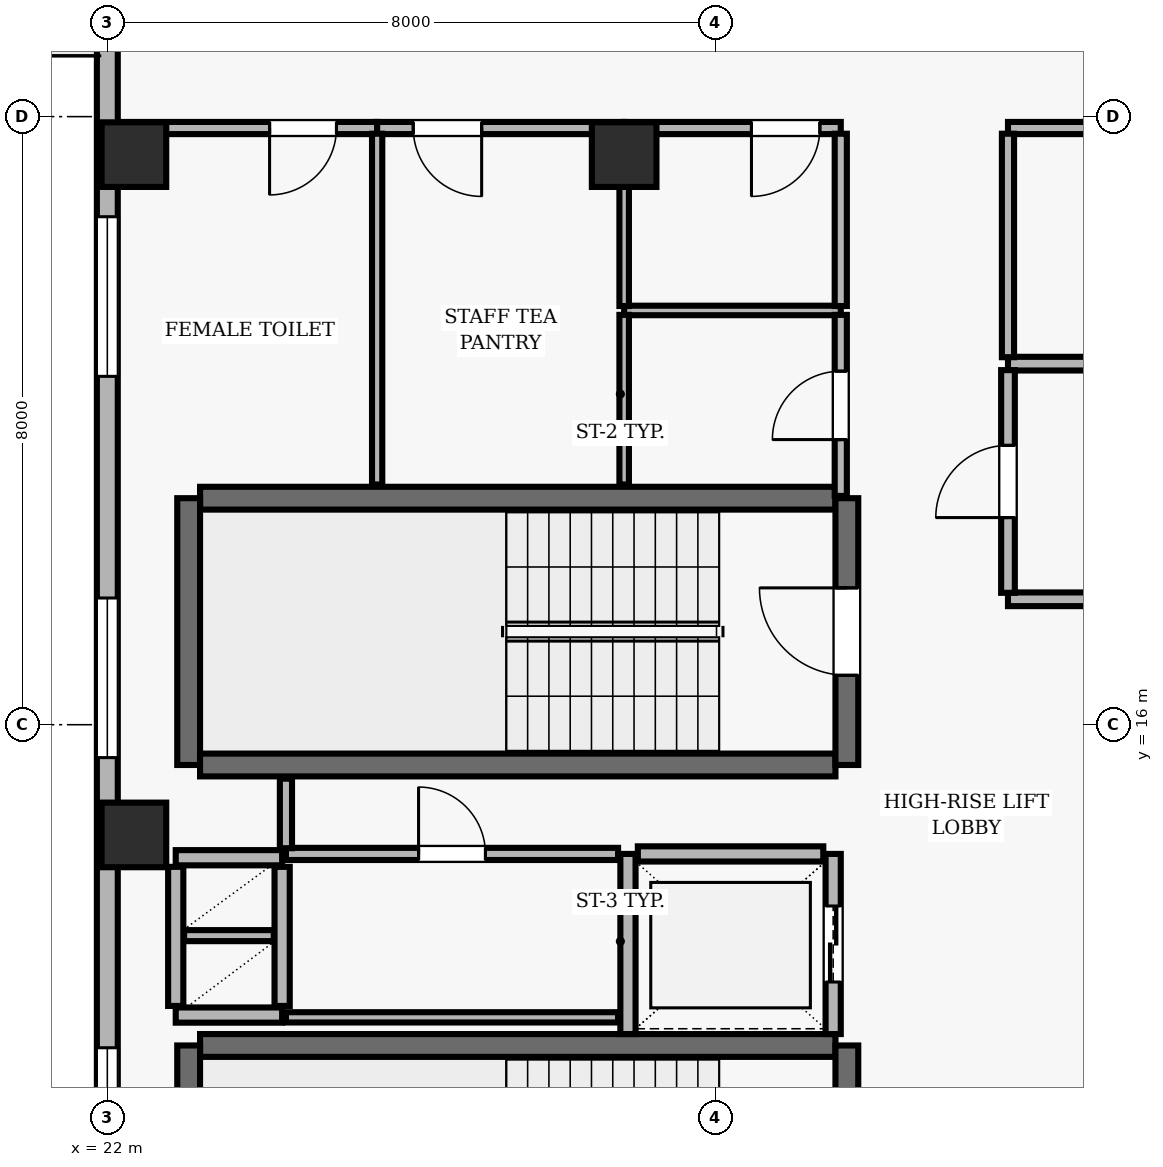
"""IFC4 building model, lengths in metres.
Left out: names, types, materials, properties, quantities, classifications, styles, units other than length and angle.
Written with IfcOpenShell. Run it as: python <this file> out.ifc"""

import sys

from ifc_helpers import new_model, si_unit, direction, frame, frame_2d, origin, origin_2d, place, context, subcontext, project, spatial, rectangle, extrude, element, fill, save


model = new_model("IFC4")
c1 = context("Model", 3, precision=1e-05, world=origin(), true_north=direction((0.0, 1.0)))
c2 = subcontext(c1, "Body", "Model", "MODEL_VIEW")
j1 = project(units=[si_unit("LENGTHUNIT", "METRE"), si_unit("PLANEANGLEUNIT", "RADIAN")], contexts=[c1])
p1 = place(None, origin())
s1 = spatial("IfcSite", under=j1, at=p1, CompositionType="ELEMENT")
p2 = place(p1, origin())
s2 = spatial("IfcBuilding", under=s1, at=p2, CompositionType="ELEMENT")
p3 = place(p2, frame((0.0, 0.0, 259.9)))
s3 = spatial("IfcBuildingStorey", under=s2, at=p3, CompositionType="ELEMENT", Elevation=259.9)
for number, where, z_axis, x_axis in (
    (1, (22.35, 14.55, 0.0), (0.0, 0.0, 1.0), (1.0, 0.0, 0.0)),
    (2, (22.35, 23.5, 0.0), (0.0, 0.0, 1.0), (1.0, 0.0, 0.0)),
    (3, (28.8, 23.5, 0.0), (0.0, 0.0, 1.0), (1.0, 0.0, 0.0)),
):
    element("IfcColumn", number, at=place(p3, frame(where, z_axis=z_axis, x_axis=x_axis)), inside=s3, PredefinedType="COLUMN", context=c2, shape_type="SweptSolid", body=[
        extrude(rectangle(XDim=0.85, YDim=0.85, at=origin_2d()), origin(), (0.0, 0.0, 1.0), 3.9),
    ])
p4 = place(p3, frame((22.0, 35.3, 0.0), z_axis=(0.0, 0.0, 1.0), x_axis=(0.0, -1.0, 0.0)))
e4 = element("IfcWall", 4, at=p4, inside=s3, PredefinedType="SOLIDWALL", context=c2, shape_type="SweptSolid", body=[
    extrude(rectangle(XDim=32.8, YDim=0.275, at=frame_2d((16.4, 0.0))), origin(), (0.0, 0.0, 1.0), 3.69),
])
p5 = place(p4, frame((7.3, 0.0, 0.0)))
e5 = element("IfcOpeningElement", 5, at=p5, cuts=e4, PredefinedType="OPENING", context=c2, shape_type="SweptSolid", body=[
    extrude(rectangle(XDim=1.0, YDim=2.2, at=frame_2d((0.5, 1.1))), frame((0.0, 0.147, 0.0), z_axis=(0.0, -1.0, 0.0), x_axis=(1.0, 0.0, 0.0)), (0.0, 0.0, 1.0), 0.295),
])
p6 = place(p4, frame((12.617, 0.0, 0.9)))
e6 = element("IfcOpeningElement", 6, at=p6, cuts=e4, PredefinedType="OPENING", context=c2, shape_type="SweptSolid", body=[
    extrude(rectangle(XDim=2.1, YDim=1.6, at=frame_2d((1.05, 0.8))), frame((0.0, 0.147, 0.0), z_axis=(0.0, -1.0, 0.0), x_axis=(1.0, 0.0, 0.0)), (0.0, 0.0, 1.0), 0.295),
])
p7 = place(p4, frame((17.633, 0.0, 0.9)))
e7 = element("IfcOpeningElement", 7, at=p7, cuts=e4, PredefinedType="OPENING", context=c2, shape_type="SweptSolid", body=[
    extrude(rectangle(XDim=2.1, YDim=1.6, at=frame_2d((1.05, 0.8))), frame((0.0, 0.147, 0.0), z_axis=(0.0, -1.0, 0.0), x_axis=(1.0, 0.0, 0.0)), (0.0, 0.0, 1.0), 0.295),
])
p8 = place(p4, frame((23.55, 0.0, 0.9)))
e8 = element("IfcOpeningElement", 8, at=p8, cuts=e4, PredefinedType="OPENING", context=c2, shape_type="SweptSolid", body=[
    extrude(rectangle(XDim=2.1, YDim=1.6, at=frame_2d((1.05, 0.8))), frame((0.0, 0.147, 0.0), z_axis=(0.0, -1.0, 0.0), x_axis=(1.0, 0.0, 0.0)), (0.0, 0.0, 1.0), 0.295),
])
p9 = place(p3, frame((31.58, 18.98, 0.0), z_axis=(0.0, 0.0, 1.0), x_axis=(-1.0, 0.0, 0.0)))
e9 = element("IfcWall", 9, at=p9, inside=s3, PredefinedType="SHEAR", context=c2, shape_type="SweptSolid", body=[
    extrude(rectangle(XDim=8.36, YDim=0.3, at=frame_2d((4.18, 0.0))), origin(), (0.0, 0.0, 1.0), 3.69),
])
p10 = place(p3, frame((23.07, 18.98, 0.0), z_axis=(0.0, 0.0, 1.0), x_axis=(0.0, -1.0, 0.0)))
e10 = element("IfcWall", 10, at=p10, inside=s3, PredefinedType="SHEAR", context=c2, shape_type="SweptSolid", body=[
    extrude(rectangle(XDim=3.51, YDim=0.3, at=frame_2d((1.755, 0.0))), origin(), (0.0, 0.0, 1.0), 3.69),
])
p11 = place(p3, frame((23.22, 15.47, 0.0), z_axis=(0.0, 0.0, 1.0), x_axis=(1.0, 0.0, 0.0)))
e11 = element("IfcWall", 11, at=p11, inside=s3, PredefinedType="SHEAR", context=c2, shape_type="SweptSolid", body=[
    extrude(rectangle(XDim=8.36, YDim=0.3, at=frame_2d((4.18, 0.0))), origin(), (0.0, 0.0, 1.0), 3.69),
])
p12 = place(p3, frame((31.73, 15.47, 0.0), z_axis=(0.0, 0.0, 1.0), x_axis=(0.0, 1.0, 0.0)))
e12 = element("IfcWall", 12, at=p12, inside=s3, PredefinedType="SHEAR", context=c2, shape_type="SweptSolid", body=[
    extrude(rectangle(XDim=3.51, YDim=0.3, at=frame_2d((1.755, 0.0))), origin(), (0.0, 0.0, 1.0), 3.69),
])
p13 = place(p12, frame((1.18, 0.0, 0.0)))
e13 = element("IfcOpeningElement", 13, at=p13, cuts=e12, PredefinedType="OPENING", context=c2, shape_type="SweptSolid", body=[
    extrude(rectangle(XDim=1.15, YDim=2.15, at=frame_2d((0.575, 1.075))), frame((0.0, 0.16, 0.0), z_axis=(0.0, -1.0, 0.0), x_axis=(1.0, 0.0, 0.0)), (0.0, 0.0, 1.0), 0.32),
])
p14 = place(p3, frame((31.58, 11.78, 0.0), z_axis=(0.0, 0.0, 1.0), x_axis=(-1.0, 0.0, 0.0)))
e14 = element("IfcWall", 14, at=p14, inside=s3, PredefinedType="SHEAR", context=c2, shape_type="SweptSolid", body=[
    extrude(rectangle(XDim=8.36, YDim=0.3, at=frame_2d((4.18, 0.0))), origin(), (0.0, 0.0, 1.0), 3.69),
])
p15 = place(p3, frame((23.07, 11.78, 0.0), z_axis=(0.0, 0.0, 1.0), x_axis=(0.0, -1.0, 0.0)))
e15 = element("IfcWall", 15, at=p15, inside=s3, PredefinedType="SHEAR", context=c2, shape_type="SweptSolid", body=[
    extrude(rectangle(XDim=3.51, YDim=0.3, at=frame_2d((1.755, 0.0))), origin(), (0.0, 0.0, 1.0), 3.69),
])
p16 = place(p3, frame((31.73, 8.27, 0.0), z_axis=(0.0, 0.0, 1.0), x_axis=(0.0, 1.0, 0.0)))
e16 = element("IfcWall", 16, at=p16, inside=s3, PredefinedType="SHEAR", context=c2, shape_type="SweptSolid", body=[
    extrude(rectangle(XDim=3.51, YDim=0.3, at=frame_2d((1.755, 0.0))), origin(), (0.0, 0.0, 1.0), 3.69),
])
p17 = place(p16, frame((1.18, 0.0, 0.0)))
e17 = element("IfcOpeningElement", 17, at=p17, cuts=e16, PredefinedType="OPENING", context=c2, shape_type="SweptSolid", body=[
    extrude(rectangle(XDim=1.15, YDim=2.15, at=frame_2d((0.575, 1.075))), frame((0.0, 0.16, 0.0), z_axis=(0.0, -1.0, 0.0), x_axis=(1.0, 0.0, 0.0)), (0.0, 0.0, 1.0), 0.32),
])
p18 = place(p3, frame((28.85, 14.3, 0.0), z_axis=(0.0, 0.0, 1.0), x_axis=(0.0, -1.0, 0.0)))
e18 = element("IfcWall", 18, at=p18, inside=s3, PredefinedType="SOLIDWALL", context=c2, shape_type="SweptSolid", body=[
    extrude(rectangle(XDim=2.37, YDim=0.2, at=frame_2d((1.185, 0.0))), origin(), (0.0, 0.0, 1.0), 3.69),
])
p19 = place(p3, frame((31.55, 11.93, 0.0), z_axis=(0.0, 0.0, 1.0), x_axis=(0.0, 1.0, 0.0)))
e19 = element("IfcWall", 19, at=p19, inside=s3, PredefinedType="SOLIDWALL", context=c2, shape_type="SweptSolid", body=[
    extrude(rectangle(XDim=2.37, YDim=0.2, at=frame_2d((1.185, 0.0))), origin(), (0.0, 0.0, 1.0), 3.69),
])
p20 = place(p19, frame((0.685, 0.0, 0.0)))
e20 = element("IfcOpeningElement", 20, at=p20, cuts=e19, PredefinedType="OPENING", context=c2, shape_type="SweptSolid", body=[
    extrude(rectangle(XDim=1.0, YDim=2.1, at=frame_2d((0.5, 1.05))), frame((0.0, 0.11, 0.0), z_axis=(0.0, -1.0, 0.0), x_axis=(1.0, 0.0, 0.0)), (0.0, 0.0, 1.0), 0.22),
])
p21 = place(p3, frame((31.42, 14.3, 0.0), z_axis=(0.0, 0.0, 1.0), x_axis=(-1.0, 0.0, 0.0)))
e21 = element("IfcWall", 21, at=p21, inside=s3, PredefinedType="SOLIDWALL", context=c2, shape_type="SweptSolid", body=[
    extrude(rectangle(XDim=2.44, YDim=0.2, at=frame_2d((1.22, 0.0))), origin(), (0.0, 0.0, 1.0), 3.69),
])
for number, where, z_axis, x_axis in (
    (22, (22.9, 14.25, 0.0), (0.0, 0.0, 1.0), (1.0, 0.0, 0.0)),
    (23, (22.9, 12.18, 0.0), (0.0, 0.0, 1.0), (1.0, 0.0, 0.0)),
):
    element("IfcWall", number, at=place(p3, frame(where, z_axis=z_axis, x_axis=x_axis)), inside=s3, PredefinedType="SOLIDWALL", context=c2, shape_type="SweptSolid", body=[
        extrude(rectangle(XDim=1.4, YDim=0.2, at=frame_2d((0.7, 0.0))), origin(), (0.0, 0.0, 1.0), 3.69),
    ])
for number, where, z_axis, x_axis in (
    (24, (24.3, 12.3, 0.0), (0.0, 0.0, 1.0), (0.0, 1.0, 0.0)),
    (25, (22.9, 12.3, 0.0), (0.0, 0.0, 1.0), (0.0, 1.0, 0.0)),
):
    element("IfcWall", number, at=place(p3, frame(where, z_axis=z_axis, x_axis=x_axis)), inside=s3, PredefinedType="SOLIDWALL", context=c2, shape_type="SweptSolid", body=[
        extrude(rectangle(XDim=1.83, YDim=0.2, at=frame_2d((0.915, 0.0))), origin(), (0.0, 0.0, 1.0), 3.69),
    ])
p22 = place(p3, frame((23.01, 13.225, 0.0), z_axis=(0.0, 0.0, 1.0), x_axis=(1.0, 0.0, 0.0)))
e26 = element("IfcWall", 26, at=p22, inside=s3, PredefinedType="PARTITIONING", context=c2, shape_type="SweptSolid", body=[
    extrude(rectangle(XDim=1.18, YDim=0.145, at=frame_2d((0.59, 0.0))), origin(), (0.0, 0.0, 1.0), 3.69),
])
p23 = place(p3, frame((24.35, 12.15, 0.0), z_axis=(0.0, 0.0, 1.0), x_axis=(1.0, 0.0, 0.0)))
e27 = element("IfcWall", 27, at=p23, inside=s3, PredefinedType="PARTITIONING", context=c2, shape_type="SweptSolid", body=[
    extrude(rectangle(XDim=4.37, YDim=0.135, at=frame_2d((2.185, 0.0))), origin(), (0.0, 0.0, 1.0), 3.69),
])
p24 = place(p3, frame((24.35, 14.3, 0.0), z_axis=(0.0, 0.0, 1.0), x_axis=(1.0, 0.0, 0.0)))
e28 = element("IfcWall", 28, at=p24, inside=s3, PredefinedType="PARTITIONING", context=c2, shape_type="SweptSolid", body=[
    extrude(rectangle(XDim=4.37, YDim=0.16, at=frame_2d((2.185, 0.0))), origin(), (0.0, 0.0, 1.0), 3.69),
])
p25 = place(p24, frame((1.745, 0.0, 0.0)))
e29 = element("IfcOpeningElement", 29, at=p25, cuts=e28, PredefinedType="OPENING", context=c2, shape_type="SweptSolid", body=[
    extrude(rectangle(XDim=0.88, YDim=2.1, at=frame_2d((0.44, 1.05))), frame((0.0, 0.09, 0.0), z_axis=(0.0, -1.0, 0.0), x_axis=(1.0, 0.0, 0.0)), (0.0, 0.0, 1.0), 0.18),
])
p26 = place(p3, frame((25.55, 23.85, 0.0), z_axis=(0.0, 0.0, 1.0), x_axis=(-1.0, 0.0, 0.0)))
e30 = element("IfcWall", 30, at=p26, inside=s3, PredefinedType="PARTITIONING", context=c2, shape_type="SweptSolid", body=[
    extrude(rectangle(XDim=3.35, YDim=0.16, at=frame_2d((1.675, 0.0))), origin(), (0.0, 0.0, 1.0), 3.227),
])
p27 = place(p26, frame((0.535, 0.0, 0.0)))
e31 = element("IfcOpeningElement", 31, at=p27, cuts=e30, PredefinedType="OPENING", context=c2, shape_type="SweptSolid", body=[
    extrude(rectangle(XDim=0.88, YDim=2.1, at=frame_2d((0.44, 1.05))), frame((0.0, 0.09, 0.0), z_axis=(0.0, -1.0, 0.0), x_axis=(1.0, 0.0, 0.0)), (0.0, 0.0, 1.0), 0.18),
])
p28 = place(p3, frame((28.8, 23.85, 0.0), z_axis=(0.0, 0.0, 1.0), x_axis=(-1.0, 0.0, 0.0)))
e32 = element("IfcWall", 32, at=p28, inside=s3, PredefinedType="PARTITIONING", context=c2, shape_type="SweptSolid", body=[
    extrude(rectangle(XDim=3.25, YDim=0.16, at=frame_2d((1.625, 0.0))), origin(), (0.0, 0.0, 1.0), 3.227),
])
p29 = place(p28, frame((1.875, 0.0, 0.0)))
e33 = element("IfcOpeningElement", 33, at=p29, cuts=e32, PredefinedType="OPENING", context=c2, shape_type="SweptSolid", body=[
    extrude(rectangle(XDim=0.9, YDim=2.1, at=frame_2d((0.45, 1.05))), frame((0.0, 0.09, 0.0), z_axis=(0.0, -1.0, 0.0), x_axis=(1.0, 0.0, 0.0)), (0.0, 0.0, 1.0), 0.18),
])
p30 = place(p3, frame((31.65, 21.45, 0.0), z_axis=(0.0, 0.0, 1.0), x_axis=(-1.0, 0.0, 0.0)))
e34 = element("IfcWall", 34, at=p30, inside=s3, PredefinedType="PARTITIONING", context=c2, shape_type="SweptSolid", body=[
    extrude(rectangle(XDim=2.85, YDim=0.125, at=frame_2d((1.425, 0.0))), origin(), (0.0, 0.0, 1.0), 3.69),
])
p31 = place(p3, frame((31.65, 23.85, 0.0), z_axis=(0.0, 0.0, 1.0), x_axis=(-1.0, 0.0, 0.0)))
e35 = element("IfcWall", 35, at=p31, inside=s3, PredefinedType="PARTITIONING", context=c2, shape_type="SweptSolid", body=[
    extrude(rectangle(XDim=2.85, YDim=0.16, at=frame_2d((1.425, 0.0))), origin(), (0.0, 0.0, 1.0), 3.227),
])
p32 = place(p31, frame((0.275, 0.0, 0.0)))
e36 = element("IfcOpeningElement", 36, at=p32, cuts=e35, PredefinedType="OPENING", context=c2, shape_type="SweptSolid", body=[
    extrude(rectangle(XDim=0.9, YDim=2.1, at=frame_2d((0.45, 1.05))), frame((0.0, 0.09, 0.0), z_axis=(0.0, -1.0, 0.0), x_axis=(1.0, 0.0, 0.0)), (0.0, 0.0, 1.0), 0.18),
])
p33 = place(p3, frame((33.85, 17.65, 0.0), z_axis=(0.0, 0.0, 1.0), x_axis=(1.0, 0.0, 0.0)))
e37 = element("IfcWall", 37, at=p33, inside=s3, PredefinedType="PARTITIONING", context=c2, shape_type="SweptSolid", body=[
    extrude(rectangle(XDim=1.3, YDim=0.18, at=frame_2d((0.65, 0.0))), origin(), (0.0, 0.0, 1.0), 3.69),
])
p34 = place(p3, frame((37.85, 20.75, 0.0), z_axis=(0.0, 0.0, 1.0), x_axis=(-1.0, 0.0, 0.0)))
e38 = element("IfcWall", 38, at=p34, inside=s3, PredefinedType="PARTITIONING", context=c2, shape_type="SweptSolid", body=[
    extrude(rectangle(XDim=4.0, YDim=0.18, at=frame_2d((2.0, 0.0))), origin(), (0.0, 0.0, 1.0), 3.69),
])
p35 = place(p3, frame((37.85, 23.85, 0.0), z_axis=(0.0, 0.0, 1.0), x_axis=(-1.0, 0.0, 0.0)))
e39 = element("IfcWall", 39, at=p35, inside=s3, PredefinedType="PARTITIONING", context=c2, shape_type="SweptSolid", body=[
    extrude(rectangle(XDim=4.0, YDim=0.16, at=frame_2d((2.0, 0.0))), origin(), (0.0, 0.0, 1.0), 3.227),
])
p36 = place(p35, frame((1.9, 0.0, 0.0)))
e40 = element("IfcOpeningElement", 40, at=p36, cuts=e39, PredefinedType="OPENING", context=c2, shape_type="SweptSolid", body=[
    extrude(rectangle(XDim=0.9, YDim=2.1, at=frame_2d((0.45, 1.05))), frame((0.0, 0.09, 0.0), z_axis=(0.0, -1.0, 0.0), x_axis=(1.0, 0.0, 0.0)), (0.0, 0.0, 1.0), 0.18),
])
p37 = place(p3, frame((24.35, 15.29, 0.0), z_axis=(0.0, 0.0, 1.0), x_axis=(0.0, -1.0, 0.0)))
e41 = element("IfcWall", 41, at=p37, inside=s3, PredefinedType="PARTITIONING", context=c2, shape_type="SweptSolid", body=[
    extrude(rectangle(XDim=0.915, YDim=0.16, at=frame_2d((0.458, 0.0))), origin(), (0.0, 0.0, 1.0), 3.69),
])
p38 = place(p3, frame((25.55, 19.16, 0.0), z_axis=(0.0, 0.0, 1.0), x_axis=(0.0, 1.0, 0.0)))
e42 = element("IfcWall", 42, at=p38, inside=s3, PredefinedType="PARTITIONING", context=c2, shape_type="SweptSolid", body=[
    extrude(rectangle(XDim=4.615, YDim=0.135, at=frame_2d((2.308, 0.0))), origin(), (0.0, 0.0, 1.0), 3.69),
])
p39 = place(p3, frame((28.8, 21.392, 0.0), z_axis=(0.0, 0.0, 1.0), x_axis=(0.0, -1.0, 0.0)))
e43 = element("IfcWall", 43, at=p39, inside=s3, PredefinedType="PARTITIONING", context=c2, shape_type="SweptSolid", body=[
    extrude(rectangle(XDim=2.232, YDim=0.125, at=frame_2d((1.116, 0.0))), origin(), (0.0, 0.0, 1.0), 3.69),
])
p40 = place(p3, frame((28.8, 23.775, 0.0), z_axis=(0.0, 0.0, 1.0), x_axis=(0.0, -1.0, 0.0)))
e44 = element("IfcWall", 44, at=p40, inside=s3, PredefinedType="PARTITIONING", context=c2, shape_type="SweptSolid", body=[
    extrude(rectangle(XDim=2.267, YDim=0.125, at=frame_2d((1.133, 0.0))), origin(), (0.0, 0.0, 1.0), 3.69),
])
p41 = place(p3, frame((31.65, 19.01, 0.0), z_axis=(0.0, 0.0, 1.0), x_axis=(0.0, 1.0, 0.0)))
e45 = element("IfcWall", 45, at=p41, inside=s3, PredefinedType="PARTITIONING", context=c2, shape_type="SweptSolid", body=[
    extrude(rectangle(XDim=2.382, YDim=0.16, at=frame_2d((1.191, 0.0))), origin(), (0.0, 0.0, 1.0), 3.69),
])
p42 = place(p41, frame((0.741, 0.0, 0.0)))
e46 = element("IfcOpeningElement", 46, at=p42, cuts=e45, PredefinedType="OPENING", context=c2, shape_type="SweptSolid", body=[
    extrude(rectangle(XDim=0.9, YDim=2.1, at=frame_2d((0.45, 1.05))), frame((0.0, 0.09, 0.0), z_axis=(0.0, -1.0, 0.0), x_axis=(1.0, 0.0, 0.0)), (0.0, 0.0, 1.0), 0.18),
])
p43 = place(p3, frame((31.65, 23.775, 0.0), z_axis=(0.0, 0.0, 1.0), x_axis=(0.0, -1.0, 0.0)))
e47 = element("IfcWall", 47, at=p43, inside=s3, PredefinedType="PARTITIONING", context=c2, shape_type="SweptSolid", body=[
    extrude(rectangle(XDim=2.267, YDim=0.16, at=frame_2d((1.133, 0.0))), origin(), (0.0, 0.0, 1.0), 3.69),
])
p44 = place(p3, frame((33.85, 17.735, 0.0), z_axis=(0.0, 0.0, 1.0), x_axis=(0.0, 1.0, 0.0)))
e48 = element("IfcWall", 48, at=p44, inside=s3, PredefinedType="PARTITIONING", context=c2, shape_type="SweptSolid", body=[
    extrude(rectangle(XDim=2.93, YDim=0.18, at=frame_2d((1.465, 0.0))), origin(), (0.0, 0.0, 1.0), 3.69),
])
p45 = place(p44, frame((0.99, 0.0, 0.0)))
e49 = element("IfcOpeningElement", 49, at=p45, cuts=e48, PredefinedType="OPENING", context=c2, shape_type="SweptSolid", body=[
    extrude(rectangle(XDim=0.95, YDim=2.1, at=frame_2d((0.475, 1.05))), frame((0.0, 0.1, 0.0), z_axis=(0.0, -1.0, 0.0), x_axis=(1.0, 0.0, 0.0)), (0.0, 0.0, 1.0), 0.2),
])
p46 = place(p3, frame((33.85, 20.835, 0.0), z_axis=(0.0, 0.0, 1.0), x_axis=(0.0, 1.0, 0.0)))
e50 = element("IfcWall", 50, at=p46, inside=s3, PredefinedType="PARTITIONING", context=c2, shape_type="SweptSolid", body=[
    extrude(rectangle(XDim=2.94, YDim=0.16, at=frame_2d((1.47, 0.0))), origin(), (0.0, 0.0, 1.0), 3.69),
])
p47 = place(p6, origin())
e51 = element("IfcWindow", 51, at=p47, inside=s3, PartitioningType="SINGLE_PANEL", PredefinedType="WINDOW", context=c2, shape_type="SweptSolid", body=[
    extrude(rectangle(XDim=2.1, YDim=1.6, at=frame_2d((1.05, 0.8))), frame((0.0, 0.03, 0.0), z_axis=(0.0, -1.0, 0.0), x_axis=(1.0, 0.0, 0.0)), (0.0, 0.0, 1.0), 0.06),
])
fill(e6, e51)
p48 = place(p7, origin())
e52 = element("IfcWindow", 52, at=p48, inside=s3, PartitioningType="SINGLE_PANEL", PredefinedType="WINDOW", context=c2, shape_type="SweptSolid", body=[
    extrude(rectangle(XDim=2.1, YDim=1.6, at=frame_2d((1.05, 0.8))), frame((0.0, 0.03, 0.0), z_axis=(0.0, -1.0, 0.0), x_axis=(1.0, 0.0, 0.0)), (0.0, 0.0, 1.0), 0.06),
])
fill(e7, e52)
p49 = place(p8, origin())
e53 = element("IfcWindow", 53, at=p49, inside=s3, PartitioningType="SINGLE_PANEL", PredefinedType="WINDOW", context=c2, shape_type="SweptSolid", body=[
    extrude(rectangle(XDim=2.1, YDim=1.6, at=frame_2d((1.05, 0.8))), frame((0.0, 0.03, 0.0), z_axis=(0.0, -1.0, 0.0), x_axis=(1.0, 0.0, 0.0)), (0.0, 0.0, 1.0), 0.06),
])
fill(e8, e53)
p50 = place(p13, origin())
e54 = element("IfcDoor", 54, at=p50, inside=s3, OperationType="SINGLE_SWING_RIGHT", PredefinedType="DOOR", context=c2, shape_type="SweptSolid", body=[
    extrude(rectangle(XDim=1.15, YDim=2.15, at=frame_2d((0.575, 1.075))), frame((0.0, 0.025, 0.0), z_axis=(0.0, -1.0, 0.0), x_axis=(1.0, 0.0, 0.0)), (0.0, 0.0, 1.0), 0.05),
])
fill(e13, e54)
p51 = place(p20, origin())
e55 = element("IfcDoor", 55, at=p51, inside=s3, OperationType="DOUBLE_DOOR_SLIDING", PredefinedType="DOOR", context=c2, shape_type="SweptSolid", body=[
    extrude(rectangle(XDim=1.0, YDim=2.1, at=frame_2d((0.5, 1.05))), frame((0.0, 0.025, 0.0), z_axis=(0.0, -1.0, 0.0), x_axis=(1.0, 0.0, 0.0)), (0.0, 0.0, 1.0), 0.05),
])
fill(e20, e55)
p52 = place(p45, origin())
e56 = element("IfcDoor", 56, at=p52, inside=s3, OperationType="SINGLE_SWING_LEFT", PredefinedType="DOOR", context=c2, shape_type="SweptSolid", body=[
    extrude(rectangle(XDim=0.95, YDim=2.1, at=frame_2d((0.475, 1.05))), frame((0.0, 0.025, 0.0), z_axis=(0.0, -1.0, 0.0), x_axis=(1.0, 0.0, 0.0)), (0.0, 0.0, 1.0), 0.05),
])
fill(e49, e56)
p53 = place(p42, origin())
e57 = element("IfcDoor", 57, at=p53, inside=s3, OperationType="SINGLE_SWING_LEFT", PredefinedType="DOOR", context=c2, shape_type="SweptSolid", body=[
    extrude(rectangle(XDim=0.9, YDim=2.1, at=frame_2d((0.45, 1.05))), frame((0.0, 0.025, 0.0), z_axis=(0.0, -1.0, 0.0), x_axis=(1.0, 0.0, 0.0)), (0.0, 0.0, 1.0), 0.05),
])
fill(e46, e57)
p54 = place(p32, origin())
e58 = element("IfcDoor", 58, at=p54, inside=s3, OperationType="SINGLE_SWING_RIGHT", PredefinedType="DOOR", context=c2, shape_type="SweptSolid", body=[
    extrude(rectangle(XDim=0.9, YDim=2.1, at=frame_2d((0.45, 1.05))), frame((0.0, 0.025, 0.0), z_axis=(0.0, -1.0, 0.0), x_axis=(1.0, 0.0, 0.0)), (0.0, 0.0, 1.0), 0.05),
])
fill(e36, e58)
p55 = place(p25, origin())
e59 = element("IfcDoor", 59, at=p55, inside=s3, OperationType="SINGLE_SWING_LEFT", PredefinedType="DOOR", context=c2, shape_type="SweptSolid", body=[
    extrude(rectangle(XDim=0.88, YDim=2.1, at=frame_2d((0.44, 1.05))), frame((0.0, 0.025, 0.0), z_axis=(0.0, -1.0, 0.0), x_axis=(1.0, 0.0, 0.0)), (0.0, 0.0, 1.0), 0.05),
])
fill(e29, e59)
p56 = place(p27, origin())
e60 = element("IfcDoor", 60, at=p56, inside=s3, OperationType="SINGLE_SWING_RIGHT", PredefinedType="DOOR", context=c2, shape_type="SweptSolid", body=[
    extrude(rectangle(XDim=0.88, YDim=2.1, at=frame_2d((0.44, 1.05))), frame((0.0, 0.025, 0.0), z_axis=(0.0, -1.0, 0.0), x_axis=(1.0, 0.0, 0.0)), (0.0, 0.0, 1.0), 0.05),
])
fill(e31, e60)
p57 = place(p29, origin())
e61 = element("IfcDoor", 61, at=p57, inside=s3, OperationType="SINGLE_SWING_LEFT", PredefinedType="DOOR", context=c2, shape_type="SweptSolid", body=[
    extrude(rectangle(XDim=0.9, YDim=2.1, at=frame_2d((0.45, 1.05))), frame((0.0, 0.025, 0.0), z_axis=(0.0, -1.0, 0.0), x_axis=(1.0, 0.0, 0.0)), (0.0, 0.0, 1.0), 0.05),
])
fill(e33, e61)
save(model, sys.argv[1])
